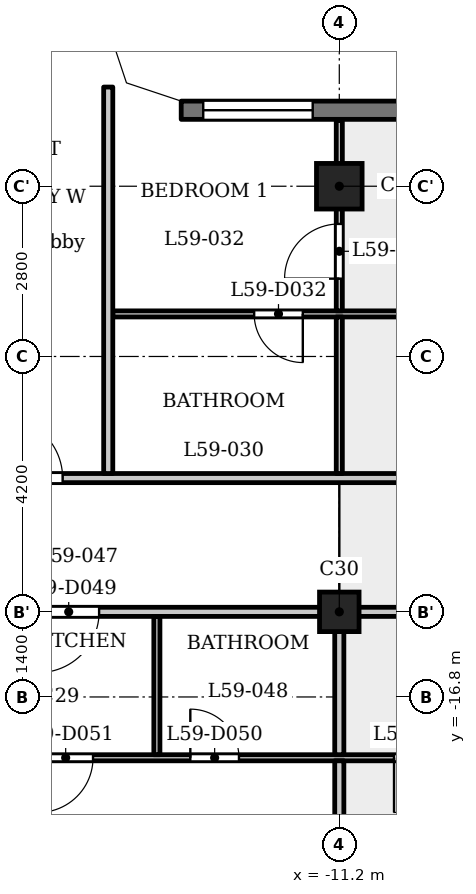
"""IFC4 building model, lengths in metres.
Left out: names, types, materials, properties, quantities, classifications, styles, units other than length and angle.
Written with IfcOpenShell. Run it as: python <this file> out.ifc"""

import sys

from ifc_helpers import new_model, si_unit, direction, frame, frame_2d, origin, origin_2d, place, context, subcontext, project, spatial, polyline, rectangle, outline, extrude, element, fill, save


model = new_model("IFC4")
c1 = context("Model", 3, precision=1e-05, world=origin(), true_north=direction((0.0, 1.0)))
c2 = subcontext(c1, "Body", "Model", "MODEL_VIEW")
j1 = project(units=[si_unit("LENGTHUNIT", "METRE"), si_unit("PLANEANGLEUNIT", "RADIAN")], contexts=[c1])
p1 = place(None, origin())
s1 = spatial("IfcSite", under=j1, at=p1, CompositionType="ELEMENT")
p2 = place(p1, origin())
s2 = spatial("IfcBuilding", under=s1, at=p2, CompositionType="ELEMENT")
p3 = place(p2, frame((0.0, 0.0, 227.4)))
s3 = spatial("IfcBuildingStorey", under=s2, at=p3, CompositionType="ELEMENT", Elevation=227.4)
p4 = place(p3, frame((-11.2, -8.4, 0.0), z_axis=(0.0, 0.0, 1.0), x_axis=(1.0, 0.0, 0.0)))
e1 = element("IfcColumn", 1, at=p4, inside=s3, PredefinedType="COLUMN", context=c2, shape_type="SweptSolid", body=[
    extrude(rectangle(XDim=0.75, YDim=0.75, at=origin_2d()), origin(), (0.0, 0.0, 1.0), 3.5),
])
p5 = place(p3, frame((-11.2, -15.4, 0.0), z_axis=(0.0, 0.0, 1.0), x_axis=(1.0, 0.0, 0.0)))
e2 = element("IfcColumn", 2, at=p5, inside=s3, PredefinedType="COLUMN", context=c2, shape_type="SweptSolid", body=[
    extrude(rectangle(XDim=0.65, YDim=0.65, at=origin_2d()), origin(), (0.0, 0.0, 1.0), 3.5),
])
p6 = place(p3, frame((13.8, -7.15, 0.0), z_axis=(0.0, 0.0, 1.0), x_axis=(-1.0, 0.0, 0.0)))
e3 = element("IfcWall", 3, at=p6, inside=s3, PredefinedType="SOLIDWALL", context=c2, shape_type="SweptSolid", body=[
    extrude(rectangle(XDim=27.6, YDim=0.3, at=frame_2d((13.8, 0.0))), origin(), (0.0, 0.0, 1.0), 3.15),
])
p7 = place(p6, frame((0.363, 0.0, 0.9)))
e4 = element("IfcOpeningElement", 4, at=p7, cuts=e3, PredefinedType="OPENING", context=c2, shape_type="SweptSolid", body=[
    extrude(rectangle(XDim=1.8, YDim=1.25, at=frame_2d((0.9, 0.625))), frame((0.0, 0.16, 0.0), z_axis=(0.0, -1.0, 0.0), x_axis=(1.0, 0.0, 0.0)), (0.0, 0.0, 1.0), 0.32),
])
p8 = place(p6, frame((3.6, 0.0, 1.2)))
e5 = element("IfcOpeningElement", 5, at=p8, cuts=e3, PredefinedType="OPENING", context=c2, shape_type="SweptSolid", body=[
    extrude(rectangle(XDim=3.6, YDim=0.95, at=frame_2d((1.8, 0.475))), frame((0.0, 0.16, 0.0), z_axis=(0.0, -1.0, 0.0), x_axis=(1.0, 0.0, 0.0)), (0.0, 0.0, 1.0), 0.32),
])
p9 = place(p6, frame((9.2, 0.0, 1.2)))
e6 = element("IfcOpeningElement", 6, at=p9, cuts=e3, PredefinedType="OPENING", context=c2, shape_type="SweptSolid", body=[
    extrude(rectangle(XDim=3.6, YDim=0.95, at=frame_2d((1.8, 0.475))), frame((0.0, 0.16, 0.0), z_axis=(0.0, -1.0, 0.0), x_axis=(1.0, 0.0, 0.0)), (0.0, 0.0, 1.0), 0.32),
])
p10 = place(p6, frame((14.8, 0.0, 1.2)))
e7 = element("IfcOpeningElement", 7, at=p10, cuts=e3, PredefinedType="OPENING", context=c2, shape_type="SweptSolid", body=[
    extrude(rectangle(XDim=3.6, YDim=0.95, at=frame_2d((1.8, 0.475))), frame((0.0, 0.16, 0.0), z_axis=(0.0, -1.0, 0.0), x_axis=(1.0, 0.0, 0.0)), (0.0, 0.0, 1.0), 0.32),
])
p11 = place(p6, frame((20.4, 0.0, 1.2)))
e8 = element("IfcOpeningElement", 8, at=p11, cuts=e3, PredefinedType="OPENING", context=c2, shape_type="SweptSolid", body=[
    extrude(rectangle(XDim=3.6, YDim=0.95, at=frame_2d((1.8, 0.475))), frame((0.0, 0.16, 0.0), z_axis=(0.0, -1.0, 0.0), x_axis=(1.0, 0.0, 0.0)), (0.0, 0.0, 1.0), 0.32),
])
p12 = place(p6, frame((25.438, 0.0, 0.9)))
e9 = element("IfcOpeningElement", 9, at=p12, cuts=e3, PredefinedType="OPENING", context=c2, shape_type="SweptSolid", body=[
    extrude(rectangle(XDim=1.8, YDim=1.25, at=frame_2d((0.9, 0.625))), frame((0.0, 0.16, 0.0), z_axis=(0.0, -1.0, 0.0), x_axis=(1.0, 0.0, 0.0)), (0.0, 0.0, 1.0), 0.32),
])
p13 = place(p3, frame((-23.594, -17.8, 0.0), z_axis=(0.0, 0.0, 1.0), x_axis=(1.0, 0.0, 0.0)))
e10 = element("IfcWall", 10, at=p13, inside=s3, PredefinedType="PARTITIONING", context=c2, shape_type="SweptSolid", body=[
    extrude(rectangle(XDim=47.188, YDim=0.1, at=frame_2d((23.594, 0.0))), origin(), (0.0, 0.0, 1.0), 3.15),
])
p14 = place(p13, frame((5.094, 0.0, 0.0)))
e11 = element("IfcOpeningElement", 11, at=p14, cuts=e10, PredefinedType="OPENING", context=c2, shape_type="SweptSolid", body=[
    extrude(rectangle(XDim=0.8, YDim=2.1, at=frame_2d((0.4, 1.05))), frame((0.0, 0.06, 0.0), z_axis=(0.0, -1.0, 0.0), x_axis=(1.0, 0.0, 0.0)), (0.0, 0.0, 1.0), 0.12),
])
p15 = place(p13, frame((1.126, 0.0, 0.0)))
e12 = element("IfcOpeningElement", 12, at=p15, cuts=e10, PredefinedType="OPENING", context=c2, shape_type="SweptSolid", body=[
    extrude(rectangle(XDim=0.9, YDim=2.1, at=frame_2d((0.45, 1.05))), frame((0.0, 0.06, 0.0), z_axis=(0.0, -1.0, 0.0), x_axis=(1.0, 0.0, 0.0)), (0.0, 0.0, 1.0), 0.12),
])
p16 = place(p13, frame((9.944, 0.0, 0.0)))
e13 = element("IfcOpeningElement", 13, at=p16, cuts=e10, PredefinedType="OPENING", context=c2, shape_type="SweptSolid", body=[
    extrude(rectangle(XDim=0.8, YDim=2.1, at=frame_2d((0.4, 1.05))), frame((0.0, 0.06, 0.0), z_axis=(0.0, -1.0, 0.0), x_axis=(1.0, 0.0, 0.0)), (0.0, 0.0, 1.0), 0.12),
])
p17 = place(p13, frame((7.444, 0.0, 0.0)))
e14 = element("IfcOpeningElement", 14, at=p17, cuts=e10, PredefinedType="OPENING", context=c2, shape_type="SweptSolid", body=[
    extrude(rectangle(XDim=0.9, YDim=2.1, at=frame_2d((0.45, 1.05))), frame((0.0, 0.06, 0.0), z_axis=(0.0, -1.0, 0.0), x_axis=(1.0, 0.0, 0.0)), (0.0, 0.0, 1.0), 0.12),
])
p18 = place(p13, frame((16.544, 0.0, 0.0)))
e15 = element("IfcOpeningElement", 15, at=p18, cuts=e10, PredefinedType="OPENING", context=c2, shape_type="SweptSolid", body=[
    extrude(rectangle(XDim=0.8, YDim=2.1, at=frame_2d((0.4, 1.05))), frame((0.0, 0.06, 0.0), z_axis=(0.0, -1.0, 0.0), x_axis=(1.0, 0.0, 0.0)), (0.0, 0.0, 1.0), 0.12),
])
p19 = place(p13, frame((13.294, 0.0, 0.0)))
e16 = element("IfcOpeningElement", 16, at=p19, cuts=e10, PredefinedType="OPENING", context=c2, shape_type="SweptSolid", body=[
    extrude(rectangle(XDim=0.9, YDim=2.1, at=frame_2d((0.45, 1.05))), frame((0.0, 0.06, 0.0), z_axis=(0.0, -1.0, 0.0), x_axis=(1.0, 0.0, 0.0)), (0.0, 0.0, 1.0), 0.12),
])
p20 = place(p13, frame((21.144, 0.0, 0.0)))
e17 = element("IfcOpeningElement", 17, at=p20, cuts=e10, PredefinedType="OPENING", context=c2, shape_type="SweptSolid", body=[
    extrude(rectangle(XDim=0.8, YDim=2.1, at=frame_2d((0.4, 1.05))), frame((0.0, 0.06, 0.0), z_axis=(0.0, -1.0, 0.0), x_axis=(1.0, 0.0, 0.0)), (0.0, 0.0, 1.0), 0.12),
])
p21 = place(p13, frame((18.894, 0.0, 0.0)))
e18 = element("IfcOpeningElement", 18, at=p21, cuts=e10, PredefinedType="OPENING", context=c2, shape_type="SweptSolid", body=[
    extrude(rectangle(XDim=0.9, YDim=2.1, at=frame_2d((0.45, 1.05))), frame((0.0, 0.06, 0.0), z_axis=(0.0, -1.0, 0.0), x_axis=(1.0, 0.0, 0.0)), (0.0, 0.0, 1.0), 0.12),
])
p22 = place(p13, frame((35.944, 0.0, 0.0)))
e19 = element("IfcOpeningElement", 19, at=p22, cuts=e10, PredefinedType="OPENING", context=c2, shape_type="SweptSolid", body=[
    extrude(rectangle(XDim=0.9, YDim=2.1, at=frame_2d((0.45, 1.05))), frame((0.0, 0.06, 0.0), z_axis=(0.0, -1.0, 0.0), x_axis=(1.0, 0.0, 0.0)), (0.0, 0.0, 1.0), 0.12),
])
p23 = place(p13, frame((32.594, 0.0, 0.0)))
e20 = element("IfcOpeningElement", 20, at=p23, cuts=e10, PredefinedType="OPENING", context=c2, shape_type="SweptSolid", body=[
    extrude(rectangle(XDim=0.9, YDim=2.1, at=frame_2d((0.45, 1.05))), frame((0.0, 0.06, 0.0), z_axis=(0.0, -1.0, 0.0), x_axis=(1.0, 0.0, 0.0)), (0.0, 0.0, 1.0), 0.12),
])
p24 = place(p13, frame((40.944, 0.0, 0.0)))
e21 = element("IfcOpeningElement", 21, at=p24, cuts=e10, PredefinedType="OPENING", context=c2, shape_type="SweptSolid", body=[
    extrude(rectangle(XDim=0.8, YDim=2.1, at=frame_2d((0.4, 1.05))), frame((0.0, 0.06, 0.0), z_axis=(0.0, -1.0, 0.0), x_axis=(1.0, 0.0, 0.0)), (0.0, 0.0, 1.0), 0.12),
])
p25 = place(p13, frame((45.444, 0.0, 0.0)))
e22 = element("IfcOpeningElement", 22, at=p25, cuts=e10, PredefinedType="OPENING", context=c2, shape_type="SweptSolid", body=[
    extrude(rectangle(XDim=0.9, YDim=2.1, at=frame_2d((0.45, 1.05))), frame((0.0, 0.06, 0.0), z_axis=(0.0, -1.0, 0.0), x_axis=(1.0, 0.0, 0.0)), (0.0, 0.0, 1.0), 0.12),
])
p26 = place(p3, frame((-24.684, -15.4, 0.0), z_axis=(0.0, 0.0, 1.0), x_axis=(1.0, 0.0, 0.0)))
e23 = element("IfcWall", 23, at=p26, inside=s3, PredefinedType="PARTITIONING", context=c2, shape_type="SweptSolid", body=[
    extrude(rectangle(XDim=49.368, YDim=0.15, at=frame_2d((24.684, 0.0))), origin(), (0.0, 0.0, 1.0), 3.15),
])
p27 = place(p26, frame((1.143, 0.0, 0.0)))
e24 = element("IfcOpeningElement", 24, at=p27, cuts=e23, PredefinedType="OPENING", context=c2, shape_type="SweptSolid", body=[
    extrude(rectangle(XDim=1.0, YDim=2.1, at=frame_2d((0.5, 1.05))), frame((0.0, 0.085, 0.0), z_axis=(0.0, -1.0, 0.0), x_axis=(1.0, 0.0, 0.0)), (0.0, 0.0, 1.0), 0.17),
])
p28 = place(p26, frame((8.534, 0.0, 0.0)))
e25 = element("IfcOpeningElement", 25, at=p28, cuts=e23, PredefinedType="OPENING", context=c2, shape_type="SweptSolid", body=[
    extrude(rectangle(XDim=1.0, YDim=2.1, at=frame_2d((0.5, 1.05))), frame((0.0, 0.085, 0.0), z_axis=(0.0, -1.0, 0.0), x_axis=(1.0, 0.0, 0.0)), (0.0, 0.0, 1.0), 0.17),
])
p29 = place(p26, frame((15.384, 0.0, 0.0)))
e26 = element("IfcOpeningElement", 26, at=p29, cuts=e23, PredefinedType="OPENING", context=c2, shape_type="SweptSolid", body=[
    extrude(rectangle(XDim=1.0, YDim=2.1, at=frame_2d((0.5, 1.05))), frame((0.0, 0.085, 0.0), z_axis=(0.0, -1.0, 0.0), x_axis=(1.0, 0.0, 0.0)), (0.0, 0.0, 1.0), 0.17),
])
p30 = place(p26, frame((19.984, 0.0, 0.0)))
e27 = element("IfcOpeningElement", 27, at=p30, cuts=e23, PredefinedType="OPENING", context=c2, shape_type="SweptSolid", body=[
    extrude(rectangle(XDim=1.0, YDim=2.1, at=frame_2d((0.5, 1.05))), frame((0.0, 0.085, 0.0), z_axis=(0.0, -1.0, 0.0), x_axis=(1.0, 0.0, 0.0)), (0.0, 0.0, 1.0), 0.17),
])
p31 = place(p26, frame((39.784, 0.0, 0.0)))
e28 = element("IfcOpeningElement", 28, at=p31, cuts=e23, PredefinedType="OPENING", context=c2, shape_type="SweptSolid", body=[
    extrude(rectangle(XDim=1.0, YDim=2.1, at=frame_2d((0.5, 1.05))), frame((0.0, 0.085, 0.0), z_axis=(0.0, -1.0, 0.0), x_axis=(1.0, 0.0, 0.0)), (0.0, 0.0, 1.0), 0.17),
])
p32 = place(p26, frame((47.384, 0.0, 0.0)))
e29 = element("IfcOpeningElement", 29, at=p32, cuts=e23, PredefinedType="OPENING", context=c2, shape_type="SweptSolid", body=[
    extrude(rectangle(XDim=1.0, YDim=2.1, at=frame_2d((0.5, 1.05))), frame((0.0, 0.085, 0.0), z_axis=(0.0, -1.0, 0.0), x_axis=(1.0, 0.0, 0.0)), (0.0, 0.0, 1.0), 0.17),
])
p33 = place(p3, frame((-17.4, -13.2, 0.0), z_axis=(0.0, 0.0, 1.0), x_axis=(1.0, 0.0, 0.0)))
e30 = element("IfcWall", 30, at=p33, inside=s3, PredefinedType="PARTITIONING", context=c2, shape_type="SweptSolid", body=[
    extrude(rectangle(XDim=34.8, YDim=0.15, at=frame_2d((17.4, 0.0))), origin(), (0.0, 0.0, 1.0), 3.15),
])
p34 = place(p33, frame((0.65, 0.0, 0.0)))
e31 = element("IfcOpeningElement", 31, at=p34, cuts=e30, PredefinedType="OPENING", context=c2, shape_type="SweptSolid", body=[
    extrude(rectangle(XDim=1.0, YDim=2.1, at=frame_2d((0.5, 1.05))), frame((0.0, 0.085, 0.0), z_axis=(0.0, -1.0, 0.0), x_axis=(1.0, 0.0, 0.0)), (0.0, 0.0, 1.0), 0.17),
])
p35 = place(p33, frame((33.05, 0.0, 0.0)))
e32 = element("IfcOpeningElement", 32, at=p35, cuts=e30, PredefinedType="OPENING", context=c2, shape_type="SweptSolid", body=[
    extrude(rectangle(XDim=1.0, YDim=2.1, at=frame_2d((0.5, 1.05))), frame((0.0, 0.085, 0.0), z_axis=(0.0, -1.0, 0.0), x_axis=(1.0, 0.0, 0.0)), (0.0, 0.0, 1.0), 0.17),
])
p36 = place(p33, frame((10.15, 0.0, 0.0)))
e33 = element("IfcOpeningElement", 33, at=p36, cuts=e30, PredefinedType="OPENING", context=c2, shape_type="SweptSolid", body=[
    extrude(rectangle(XDim=1.0, YDim=2.1, at=frame_2d((0.5, 1.05))), frame((0.0, 0.085, 0.0), z_axis=(0.0, -1.0, 0.0), x_axis=(1.0, 0.0, 0.0)), (0.0, 0.0, 1.0), 0.17),
])
p37 = place(p33, frame((12.5, 0.0, 0.0)))
e34 = element("IfcOpeningElement", 34, at=p37, cuts=e30, PredefinedType="OPENING", context=c2, shape_type="SweptSolid", body=[
    extrude(rectangle(XDim=1.0, YDim=2.1, at=frame_2d((0.5, 1.05))), frame((0.0, 0.085, 0.0), z_axis=(0.0, -1.0, 0.0), x_axis=(1.0, 0.0, 0.0)), (0.0, 0.0, 1.0), 0.17),
])
p38 = place(p33, frame((18.0, 0.0, 0.0)))
e35 = element("IfcOpeningElement", 35, at=p38, cuts=e30, PredefinedType="OPENING", context=c2, shape_type="SweptSolid", body=[
    extrude(rectangle(XDim=1.0, YDim=2.1, at=frame_2d((0.5, 1.05))), frame((0.0, 0.085, 0.0), z_axis=(0.0, -1.0, 0.0), x_axis=(1.0, 0.0, 0.0)), (0.0, 0.0, 1.0), 0.17),
])
p39 = place(p33, frame((30.75, 0.0, 0.0)))
e36 = element("IfcOpeningElement", 36, at=p39, cuts=e30, PredefinedType="OPENING", context=c2, shape_type="SweptSolid", body=[
    extrude(rectangle(XDim=1.0, YDim=2.1, at=frame_2d((0.5, 1.05))), frame((0.0, 0.085, 0.0), z_axis=(0.0, -1.0, 0.0), x_axis=(1.0, 0.0, 0.0)), (0.0, 0.0, 1.0), 0.17),
])
p40 = place(p3, frame((-14.925, -10.5, 0.0), z_axis=(0.0, 0.0, 1.0), x_axis=(1.0, 0.0, 0.0)))
e37 = element("IfcWall", 37, at=p40, inside=s3, PredefinedType="PARTITIONING", context=c2, shape_type="SweptSolid", body=[
    extrude(rectangle(XDim=29.85, YDim=0.1, at=frame_2d((14.925, 0.0))), origin(), (0.0, 0.0, 1.0), 3.15),
])
p41 = place(p40, frame((2.325, 0.0, 0.0)))
e38 = element("IfcOpeningElement", 38, at=p41, cuts=e37, PredefinedType="OPENING", context=c2, shape_type="SweptSolid", body=[
    extrude(rectangle(XDim=0.8, YDim=2.1, at=frame_2d((0.4, 1.05))), frame((0.0, 0.06, 0.0), z_axis=(0.0, -1.0, 0.0), x_axis=(1.0, 0.0, 0.0)), (0.0, 0.0, 1.0), 0.12),
])
p42 = place(p40, frame((7.775, 0.0, 0.0)))
e39 = element("IfcOpeningElement", 39, at=p42, cuts=e37, PredefinedType="OPENING", context=c2, shape_type="SweptSolid", body=[
    extrude(rectangle(XDim=0.9, YDim=2.1, at=frame_2d((0.45, 1.05))), frame((0.0, 0.06, 0.0), z_axis=(0.0, -1.0, 0.0), x_axis=(1.0, 0.0, 0.0)), (0.0, 0.0, 1.0), 0.12),
])
p43 = place(p40, frame((13.575, 0.0, 0.0)))
e40 = element("IfcOpeningElement", 40, at=p43, cuts=e37, PredefinedType="OPENING", context=c2, shape_type="SweptSolid", body=[
    extrude(rectangle(XDim=0.8, YDim=2.1, at=frame_2d((0.4, 1.05))), frame((0.0, 0.06, 0.0), z_axis=(0.0, -1.0, 0.0), x_axis=(1.0, 0.0, 0.0)), (0.0, 0.0, 1.0), 0.12),
])
p44 = place(p40, frame((10.125, 0.0, 0.0)))
e41 = element("IfcOpeningElement", 41, at=p44, cuts=e37, PredefinedType="OPENING", context=c2, shape_type="SweptSolid", body=[
    extrude(rectangle(XDim=0.9, YDim=2.1, at=frame_2d((0.45, 1.05))), frame((0.0, 0.06, 0.0), z_axis=(0.0, -1.0, 0.0), x_axis=(1.0, 0.0, 0.0)), (0.0, 0.0, 1.0), 0.12),
])
p45 = place(p40, frame((18.825, 0.0, 0.0)))
e42 = element("IfcOpeningElement", 42, at=p45, cuts=e37, PredefinedType="OPENING", context=c2, shape_type="SweptSolid", body=[
    extrude(rectangle(XDim=0.8, YDim=2.1, at=frame_2d((0.4, 1.05))), frame((0.0, 0.06, 0.0), z_axis=(0.0, -1.0, 0.0), x_axis=(1.0, 0.0, 0.0)), (0.0, 0.0, 1.0), 0.12),
])
p46 = place(p40, frame((15.625, 0.0, 0.0)))
e43 = element("IfcOpeningElement", 43, at=p46, cuts=e37, PredefinedType="OPENING", context=c2, shape_type="SweptSolid", body=[
    extrude(rectangle(XDim=0.9, YDim=2.1, at=frame_2d((0.45, 1.05))), frame((0.0, 0.06, 0.0), z_axis=(0.0, -1.0, 0.0), x_axis=(1.0, 0.0, 0.0)), (0.0, 0.0, 1.0), 0.12),
])
p47 = place(p40, frame((24.675, 0.0, 0.0)))
e44 = element("IfcOpeningElement", 44, at=p47, cuts=e37, PredefinedType="OPENING", context=c2, shape_type="SweptSolid", body=[
    extrude(rectangle(XDim=0.8, YDim=2.1, at=frame_2d((0.4, 1.05))), frame((0.0, 0.06, 0.0), z_axis=(0.0, -1.0, 0.0), x_axis=(1.0, 0.0, 0.0)), (0.0, 0.0, 1.0), 0.12),
])
p48 = place(p40, frame((28.375, 0.0, 0.0)))
e45 = element("IfcOpeningElement", 45, at=p48, cuts=e37, PredefinedType="OPENING", context=c2, shape_type="SweptSolid", body=[
    extrude(rectangle(XDim=0.9, YDim=2.1, at=frame_2d((0.45, 1.05))), frame((0.0, 0.06, 0.0), z_axis=(0.0, -1.0, 0.0), x_axis=(1.0, 0.0, 0.0)), (0.0, 0.0, 1.0), 0.12),
])
p49 = place(p3, frame((-15.0, -13.125, 0.0), z_axis=(0.0, 0.0, 1.0), x_axis=(0.0, 1.0, 0.0)))
e46 = element("IfcWall", 46, at=p49, inside=s3, PredefinedType="PARTITIONING", context=c2, shape_type="SweptSolid", body=[
    extrude(rectangle(XDim=6.356, YDim=0.15, at=frame_2d((3.178, 0.0))), origin(), (0.0, 0.0, 1.0), 3.15),
])
p50 = place(p3, frame((-14.2, -17.75, 0.0), z_axis=(0.0, 0.0, 1.0), x_axis=(0.0, 1.0, 0.0)))
e47 = element("IfcWall", 47, at=p50, inside=s3, PredefinedType="PARTITIONING", context=c2, shape_type="SweptSolid", body=[
    extrude(rectangle(XDim=2.275, YDim=0.1, at=frame_2d((1.137, 0.0))), origin(), (0.0, 0.0, 1.0), 3.15),
])
p51 = place(p3, frame((-11.2, -13.125, 0.0), z_axis=(0.0, 0.0, 1.0), x_axis=(0.0, 1.0, 0.0)))
e48 = element("IfcWall", 48, at=p51, inside=s3, PredefinedType="PARTITIONING", context=c2, shape_type="SweptSolid", body=[
    extrude(rectangle(XDim=2.575, YDim=0.1, at=frame_2d((1.288, 0.0))), origin(), (0.0, 0.0, 1.0), 3.15),
])
p52 = place(p3, frame((-11.2, -10.45, 0.0), z_axis=(0.0, 0.0, 1.0), x_axis=(0.0, 1.0, 0.0)))
e49 = element("IfcWall", 49, at=p52, inside=s3, PredefinedType="PARTITIONING", context=c2, shape_type="SweptSolid", body=[
    extrude(rectangle(XDim=3.13, YDim=0.1, at=frame_2d((1.565, 0.0))), origin(), (0.0, 0.0, 1.0), 3.15),
])
p53 = place(p52, frame((0.53, 0.0, 0.0)))
e50 = element("IfcOpeningElement", 50, at=p53, cuts=e49, PredefinedType="OPENING", context=c2, shape_type="SweptSolid", body=[
    extrude(rectangle(XDim=0.9, YDim=2.1, at=frame_2d((0.45, 1.05))), frame((0.0, 0.06, 0.0), z_axis=(0.0, -1.0, 0.0), x_axis=(1.0, 0.0, 0.0)), (0.0, 0.0, 1.0), 0.12),
])
p54 = place(p3, frame((-11.2, -22.08, 0.0), z_axis=(0.0, 0.0, 1.0), x_axis=(0.0, 1.0, 0.0)))
e51 = element("IfcWall", 51, at=p54, inside=s3, PredefinedType="PARTITIONING", context=c2, shape_type="SweptSolid", body=[
    extrude(rectangle(XDim=4.23, YDim=0.15, at=frame_2d((2.115, 0.0))), origin(), (0.0, 0.0, 1.0), 3.15),
])
p55 = place(p3, frame((-11.2, -17.75, 0.0), z_axis=(0.0, 0.0, 1.0), x_axis=(0.0, 1.0, 0.0)))
e52 = element("IfcWall", 52, at=p55, inside=s3, PredefinedType="PARTITIONING", context=c2, shape_type="SweptSolid", body=[
    extrude(rectangle(XDim=2.275, YDim=0.15, at=frame_2d((1.137, 0.0))), origin(), (0.0, 0.0, 1.0), 3.15),
])
p56 = place(p3, origin())
e53 = element("IfcWall", 53, at=p56, inside=s3, PredefinedType="SOLIDWALL", context=c2, shape_type="SweptSolid", body=[
    extrude(outline(polyline([(-14.937, -6.937), (-13.849, -7.3), (-13.8, -7.3), (-13.8, -7.0), (-14.7, -6.7), (-15.0, -5.8), (-15.3, -5.8), (-15.3, -5.849), (-14.937, -6.937)])), origin(), (0.0, 0.0, 1.0), 3.15),
])
p57 = place(p34, origin())
e54 = element("IfcDoor", 54, at=p57, inside=s3, OperationType="SINGLE_SWING_RIGHT", PredefinedType="DOOR", context=c2, shape_type="SweptSolid", body=[
    extrude(rectangle(XDim=1.0, YDim=2.1, at=frame_2d((0.5, 1.05))), frame((0.0, 0.025, 0.0), z_axis=(0.0, -1.0, 0.0), x_axis=(1.0, 0.0, 0.0)), (0.0, 0.0, 1.0), 0.05),
])
fill(e31, e54)
p58 = place(p41, origin())
e55 = element("IfcDoor", 55, at=p58, inside=s3, OperationType="SINGLE_SWING_RIGHT", PredefinedType="DOOR", context=c2, shape_type="SweptSolid", body=[
    extrude(rectangle(XDim=0.8, YDim=2.1, at=frame_2d((0.4, 1.05))), frame((0.0, 0.025, 0.0), z_axis=(0.0, -1.0, 0.0), x_axis=(1.0, 0.0, 0.0)), (0.0, 0.0, 1.0), 0.05),
])
fill(e38, e55)
p59 = place(p53, origin())
e56 = element("IfcDoor", 56, at=p59, inside=s3, OperationType="SINGLE_SWING_RIGHT", PredefinedType="DOOR", context=c2, shape_type="SweptSolid", body=[
    extrude(rectangle(XDim=0.9, YDim=2.1, at=frame_2d((0.45, 1.05))), frame((0.0, 0.025, 0.0), z_axis=(0.0, -1.0, 0.0), x_axis=(1.0, 0.0, 0.0)), (0.0, 0.0, 1.0), 0.05),
])
fill(e50, e56)
p60 = place(p28, origin())
e57 = element("IfcDoor", 57, at=p60, inside=s3, OperationType="SINGLE_SWING_LEFT", PredefinedType="DOOR", context=c2, shape_type="SweptSolid", body=[
    extrude(rectangle(XDim=1.0, YDim=2.1, at=frame_2d((0.5, 1.05))), frame((0.0, 0.025, 0.0), z_axis=(0.0, -1.0, 0.0), x_axis=(1.0, 0.0, 0.0)), (0.0, 0.0, 1.0), 0.05),
])
fill(e25, e57)
p61 = place(p16, origin())
e58 = element("IfcDoor", 58, at=p61, inside=s3, OperationType="SINGLE_SWING_RIGHT", PredefinedType="DOOR", context=c2, shape_type="SweptSolid", body=[
    extrude(rectangle(XDim=0.8, YDim=2.1, at=frame_2d((0.4, 1.05))), frame((0.0, 0.025, 0.0), z_axis=(0.0, -1.0, 0.0), x_axis=(1.0, 0.0, 0.0)), (0.0, 0.0, 1.0), 0.05),
])
fill(e13, e58)
p62 = place(p17, origin())
e59 = element("IfcDoor", 59, at=p62, inside=s3, OperationType="SINGLE_SWING_LEFT", PredefinedType="DOOR", context=c2, shape_type="SweptSolid", body=[
    extrude(rectangle(XDim=0.9, YDim=2.1, at=frame_2d((0.45, 1.05))), frame((0.0, 0.025, 0.0), z_axis=(0.0, -1.0, 0.0), x_axis=(1.0, 0.0, 0.0)), (0.0, 0.0, 1.0), 0.05),
])
fill(e14, e59)
p63 = place(p19, origin())
e60 = element("IfcDoor", 60, at=p63, inside=s3, OperationType="SINGLE_SWING_LEFT", PredefinedType="DOOR", context=c2, shape_type="SweptSolid", body=[
    extrude(rectangle(XDim=0.9, YDim=2.1, at=frame_2d((0.45, 1.05))), frame((0.0, 0.025, 0.0), z_axis=(0.0, -1.0, 0.0), x_axis=(1.0, 0.0, 0.0)), (0.0, 0.0, 1.0), 0.05),
])
fill(e16, e60)
p64 = place(p12, origin())
e61 = element("IfcWindow", 61, at=p64, inside=s3, PartitioningType="SINGLE_PANEL", PredefinedType="WINDOW", context=c2, shape_type="SweptSolid", body=[
    extrude(rectangle(XDim=1.8, YDim=1.25, at=frame_2d((0.9, 0.625))), frame((0.0, 0.03, 0.0), z_axis=(0.0, -1.0, 0.0), x_axis=(1.0, 0.0, 0.0)), (0.0, 0.0, 1.0), 0.06),
])
fill(e9, e61)
save(model, sys.argv[1])
